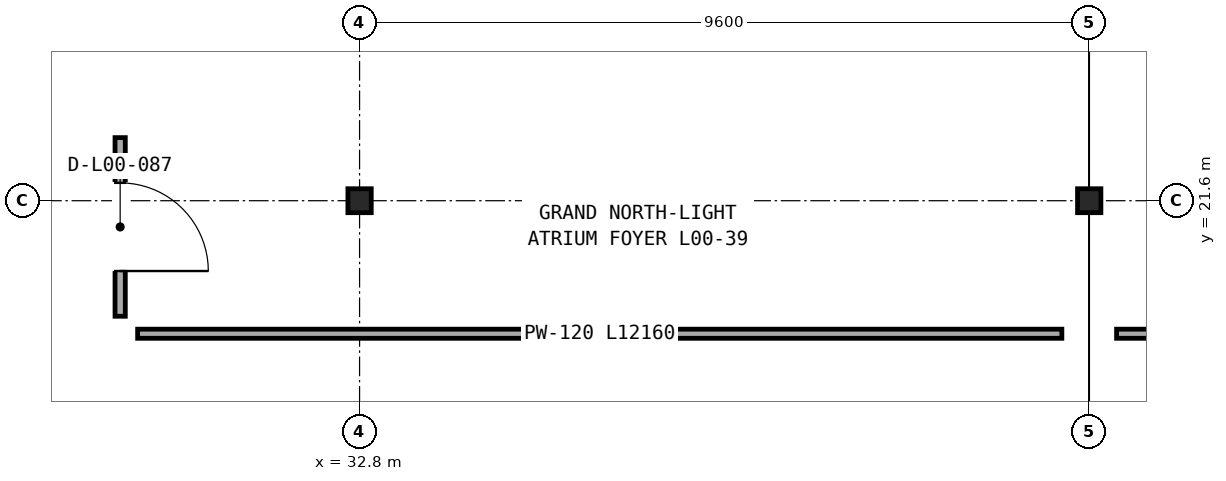
"""IFC4 building model, lengths in metres.
Left out: names, types, materials, properties, quantities, classifications, styles, units other than length and angle.
Written with IfcOpenShell. Run it as: python <this file> out.ifc"""

import sys

from ifc_helpers import new_model, si_unit, direction, frame, frame_2d, origin, origin_2d, place, context, subcontext, project, spatial, rectangle, i_section, extrude, element, fill, save


model = new_model("IFC4")
c1 = context("Model", 3, precision=1e-05, world=origin(), true_north=direction((0.0, 1.0)))
c2 = subcontext(c1, "Body", "Model", "MODEL_VIEW")
j1 = project(units=[si_unit("LENGTHUNIT", "METRE"), si_unit("PLANEANGLEUNIT", "RADIAN")], contexts=[c1])
p1 = place(None, origin())
s1 = spatial("IfcSite", under=j1, at=p1, CompositionType="ELEMENT")
p2 = place(p1, origin())
s2 = spatial("IfcBuilding", under=s1, at=p2, CompositionType="ELEMENT")
p3 = place(p2, origin())
s3 = spatial("IfcBuildingStorey", under=s2, at=p3, CompositionType="ELEMENT", Elevation=0.0)
for number, where, z_axis, x_axis in (
    (1, (32.8, 21.6, 0.0), (0.0, 0.0, 1.0), (1.0, 0.0, 0.0)),
    (2, (42.4, 21.6, 0.0), (0.0, 0.0, 1.0), (1.0, 0.0, 0.0)),
):
    element("IfcColumn", number, at=place(p3, frame(where, z_axis=z_axis, x_axis=x_axis)), inside=s3, PredefinedType="COLUMN", context=c2, shape_type="SweptSolid", body=[
        extrude(i_section(OverallWidth=0.307, OverallDepth=0.315, WebThickness=0.012, FlangeThickness=0.019, FilletRadius=0.017, at=origin_2d()), origin(), (0.0, 0.0, 1.0), 5.6),
    ])
p4 = place(p3, frame((61.93, 19.85, 0.0), z_axis=(0.0, 0.0, 1.0), x_axis=(-1.0, 0.0, 0.0)))
e3 = element("IfcWall", 3, at=p4, inside=s3, PredefinedType="PARTITIONING", context=c2, shape_type="SweptSolid", body=[
    extrude(rectangle(XDim=19.17, YDim=0.12, at=frame_2d((9.585, 0.0))), origin(), (0.0, 0.0, 1.0), 5.23),
])
p5 = place(p3, frame((29.65, 20.08, 0.0), z_axis=(0.0, 0.0, 1.0), x_axis=(0.0, 1.0, 0.0)))
e4 = element("IfcWall", 4, at=p5, inside=s3, PredefinedType="PARTITIONING", context=c2, shape_type="SweptSolid", body=[
    extrude(rectangle(XDim=2.35, YDim=0.135, at=frame_2d((1.175, 0.0))), origin(), (0.0, 0.0, 1.0), 4.638),
])
p6 = place(p5, frame((0.595, 0.0, 0.0)))
e5 = element("IfcOpeningElement", 5, at=p6, cuts=e4, PredefinedType="OPENING", context=c2, shape_type="SweptSolid", body=[
    extrude(rectangle(XDim=1.16, YDim=2.16, at=frame_2d((0.58, 1.08))), frame((0.0, 0.078, 0.0), z_axis=(0.0, -1.0, 0.0), x_axis=(1.0, 0.0, 0.0)), (0.0, 0.0, 1.0), 0.155),
])
p7 = place(p3, frame((42.04, 19.85, 0.0), z_axis=(0.0, 0.0, 1.0), x_axis=(-1.0, 0.0, 0.0)))
e6 = element("IfcWall", 6, at=p7, inside=s3, PredefinedType="PARTITIONING", context=c2, shape_type="SweptSolid", body=[
    extrude(rectangle(XDim=12.16, YDim=0.12, at=frame_2d((6.08, 0.0))), origin(), (0.0, 0.0, 1.0), 4.717),
])
p8 = place(p6, frame((1.16, 0.0, 0.0), z_axis=(0.0, 0.0, 1.0), x_axis=(-1.0, 0.0, 0.0)))
e7 = element("IfcDoor", 7, at=p8, inside=s3, OperationType="SINGLE_SWING_LEFT", PredefinedType="DOOR", context=c2, shape_type="SweptSolid", body=[
    extrude(rectangle(XDim=1.16, YDim=2.16, at=frame_2d((0.58, 1.08))), frame((0.0, 0.025, 0.0), z_axis=(0.0, -1.0, 0.0), x_axis=(1.0, 0.0, 0.0)), (0.0, 0.0, 1.0), 0.05),
])
fill(e5, e7)
save(model, sys.argv[1])
